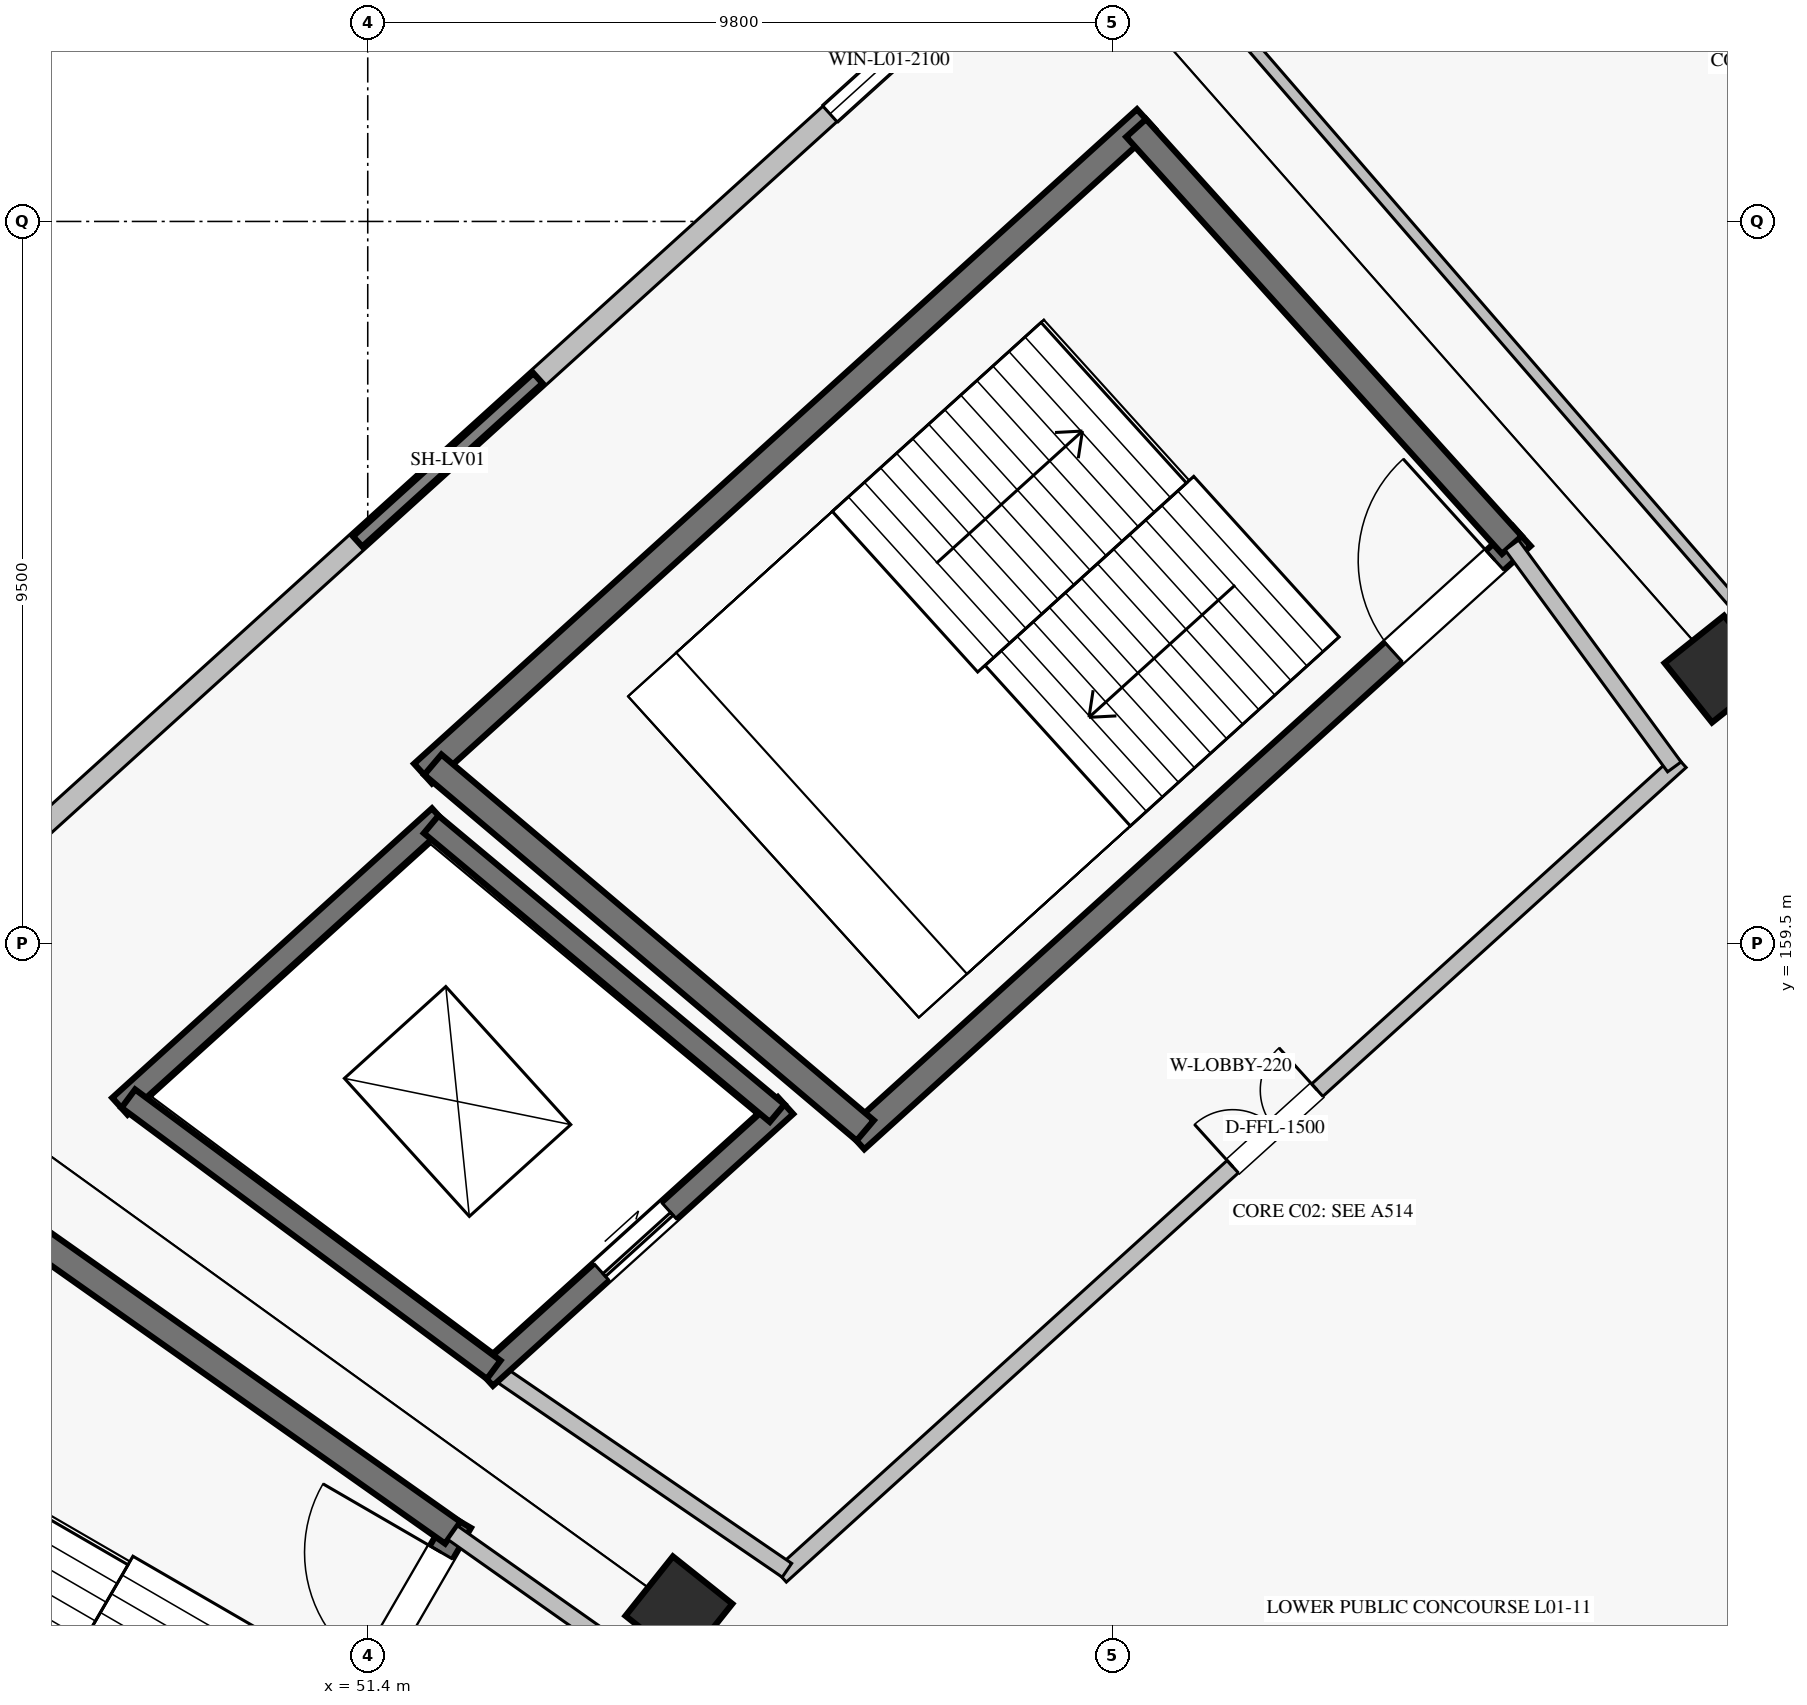
"""IFC4 building model, lengths in metres.
Left out: names, types, materials, properties, quantities, classifications, styles, units other than length and angle.
Written with IfcOpenShell. Run it as: python <this file> out.ifc"""

import sys

from ifc_helpers import new_model, si_unit, direction, frame, frame_2d, origin, origin_2d, place, context, subcontext, project, spatial, rectangle, extrude, element, fill, save


model = new_model("IFC4")
c1 = context("Model", 3, precision=1e-05, world=origin(), true_north=direction((0.0, 1.0)))
c2 = subcontext(c1, "Body", "Model", "MODEL_VIEW")
j1 = project(units=[si_unit("LENGTHUNIT", "METRE"), si_unit("PLANEANGLEUNIT", "RADIAN")], contexts=[c1])
p1 = place(None, origin())
s1 = spatial("IfcSite", under=j1, at=p1, CompositionType="ELEMENT")
p2 = place(p1, origin())
s2 = spatial("IfcBuilding", under=s1, at=p2, CompositionType="ELEMENT")
p3 = place(p2, frame((0.0, 0.0, 5.78)))
s3 = spatial("IfcBuildingStorey", under=s2, at=p3, CompositionType="ELEMENT", Elevation=5.78)
for number, where, z_axis, x_axis in (
    (1, (69.166, 163.111, 0.0), (0.0, 0.0, 1.0), (-0.623, 0.782, 0.0)),
    (2, (55.494, 150.734, 0.0), (0.0, 0.0, 1.0), (-0.782, 0.623, 0.0)),
):
    element("IfcColumn", number, at=place(p3, frame(where, z_axis=z_axis, x_axis=x_axis)), inside=s3, PredefinedType="COLUMN", context=c2, shape_type="SweptSolid", body=[
        extrude(rectangle(XDim=1.0, YDim=1.0, at=origin_2d()), origin(), (0.0, 0.0, 1.0), 4.76),
    ])
p4 = place(p3, frame((60.076, 172.764, 0.0), z_axis=(0.0, 0.0, 1.0), x_axis=(-0.741352367697, -0.671115986183, 0.0)))
e3 = element("IfcWall", 3, at=p4, inside=s3, PredefinedType="SOLIDWALL", context=c2, shape_type="SweptSolid", body=[
    extrude(rectangle(XDim=20.564, YDim=0.275, at=frame_2d((10.282, 0.0))), origin(), (0.0, 0.0, 1.0), 3.798),
])
p5 = place(p4, frame((1.4, 0.0, 1.0)))
e4 = element("IfcOpeningElement", 4, at=p5, cuts=e3, PredefinedType="OPENING", context=c2, shape_type="SweptSolid", body=[
    extrude(rectangle(XDim=2.1, YDim=1.6, at=frame_2d((1.05, 0.8))), frame((0.0, 0.147, 0.0), z_axis=(0.0, -1.0, 0.0), x_axis=(1.0, 0.0, 0.0)), (0.0, 0.0, 1.0), 0.295),
])
p6 = place(p3, frame((66.583, 164.86, 0.0), z_axis=(0.0, 0.0, 1.0), x_axis=(-0.741348929385, -0.671119784315, 0.0)))
e5 = element("IfcWall", 5, at=p6, inside=s3, PredefinedType="SHEAR", context=c2, shape_type="SweptSolid", body=[
    extrude(rectangle(XDim=11.826, YDim=0.35, at=frame_2d((5.913, 0.0))), origin(), (0.0, 0.0, 1.0), 4.5),
])
p7 = place(p6, frame((0.475, 0.0, 0.0)))
e6 = element("IfcOpeningElement", 6, at=p7, cuts=e5, PredefinedType="OPENING", context=c2, shape_type="SweptSolid", body=[
    extrude(rectangle(XDim=1.8, YDim=2.2, at=frame_2d((0.9, 1.1))), frame((0.0, 0.185, 0.0), z_axis=(0.0, -1.0, 0.0), x_axis=(1.0, 0.0, 0.0)), (0.0, 0.0, 1.0), 0.37),
])
p8 = place(p3, frame((61.639, 170.347, 0.0), z_axis=(0.0, 0.0, 1.0), x_axis=(-0.741351373721, -0.671117084183, 0.0)))
e7 = element("IfcWall", 7, at=p8, inside=s3, PredefinedType="SHEAR", context=c2, shape_type="SweptSolid", body=[
    extrude(rectangle(XDim=12.83, YDim=0.35, at=frame_2d((6.415, 0.0))), origin(), (0.0, 0.0, 1.0), 4.5),
])
p9 = place(p3, frame((66.454, 164.743, 0.0), z_axis=(0.0, 0.0, 1.0), x_axis=(-0.669463145673, 0.742845270958, 0.0)))
e8 = element("IfcWall", 8, at=p9, inside=s3, PredefinedType="SHEAR", context=c2, shape_type="SweptSolid", body=[
    extrude(rectangle(XDim=7.386, YDim=0.35, at=frame_2d((3.693, 0.0))), origin(), (0.0, 0.0, 1.0), 4.5),
])
p10 = place(p3, frame((57.945, 157.041, 0.0), z_axis=(0.0, 0.0, 1.0), x_axis=(-0.763422324031, 0.64589964791, 0.0)))
e9 = element("IfcWall", 9, at=p10, inside=s3, PredefinedType="SHEAR", context=c2, shape_type="SweptSolid", body=[
    extrude(rectangle(XDim=7.452, YDim=0.35, at=frame_2d((3.726, 0.0))), origin(), (0.0, 0.0, 1.0), 4.5),
])
p11 = place(p3, frame((56.897, 157.369, 0.0), z_axis=(0.0, 0.0, 1.0), x_axis=(-0.741350155641, -0.671118429736, 0.0)))
e10 = element("IfcWall", 10, at=p11, inside=s3, PredefinedType="SHEAR", context=c2, shape_type="SweptSolid", body=[
    extrude(rectangle(XDim=5.329, YDim=0.3, at=frame_2d((2.665, 0.0))), origin(), (0.0, 0.0, 1.0), 4.5),
])
p12 = place(p11, frame((2.065, 0.0, 0.0)))
e11 = element("IfcOpeningElement", 11, at=p12, cuts=e10, PredefinedType="OPENING", context=c2, shape_type="SweptSolid", body=[
    extrude(rectangle(XDim=1.2, YDim=2.2, at=frame_2d((0.6, 1.1))), frame((0.0, 0.16, 0.0), z_axis=(0.0, -1.0, 0.0), x_axis=(1.0, 0.0, 0.0)), (0.0, 0.0, 1.0), 0.32),
])
p13 = place(p3, frame((52.346, 161.168, 0.0), z_axis=(0.0, 0.0, 1.0), x_axis=(-0.74134208775, -0.671127341815, 0.0)))
e12 = element("IfcWall", 12, at=p13, inside=s3, PredefinedType="SHEAR", context=c2, shape_type="SweptSolid", body=[
    extrude(rectangle(XDim=5.675, YDim=0.3, at=frame_2d((2.837, 0.0))), origin(), (0.0, 0.0, 1.0), 4.5),
])
p14 = place(p3, frame((56.786, 157.268, 0.0), z_axis=(0.0, 0.0, 1.0), x_axis=(-0.767711354146, 0.640795815151, 0.0)))
e13 = element("IfcWall", 13, at=p14, inside=s3, PredefinedType="SHEAR", context=c2, shape_type="SweptSolid", body=[
    extrude(rectangle(XDim=5.929, YDim=0.3, at=frame_2d((2.964, 0.0))), origin(), (0.0, 0.0, 1.0), 4.5),
])
p15 = place(p3, frame((53.058, 153.893, 0.0), z_axis=(0.0, 0.0, 1.0), x_axis=(-0.803101805449, 0.59584183311, 0.0)))
e14 = element("IfcWall", 14, at=p15, inside=s3, PredefinedType="SHEAR", context=c2, shape_type="SweptSolid", body=[
    extrude(rectangle(XDim=5.986, YDim=0.3, at=frame_2d((2.993, 0.0))), origin(), (0.0, 0.0, 1.0), 4.5),
])
p16 = place(p3, frame((68.673, 161.898, 0.0), z_axis=(0.0, 0.0, 1.0), x_axis=(-0.741351035574, -0.671117457717, 0.0)))
e15 = element("IfcWall", 15, at=p16, inside=s3, PredefinedType="SOLIDWALL", context=c2, shape_type="SweptSolid", body=[
    extrude(rectangle(XDim=15.969, YDim=0.22, at=frame_2d((7.985, 0.0))), origin(), (0.0, 0.0, 1.0), 4.5),
])
p17 = place(p16, frame((6.447, 0.0, 0.0)))
e16 = element("IfcOpeningElement", 16, at=p17, cuts=e15, PredefinedType="OPENING", context=c2, shape_type="SweptSolid", body=[
    extrude(rectangle(XDim=1.5, YDim=2.2, at=frame_2d((0.75, 1.1))), frame((0.0, 0.12, 0.0), z_axis=(0.0, -1.0, 0.0), x_axis=(1.0, 0.0, 0.0)), (0.0, 0.0, 1.0), 0.24),
])
p18 = place(p3, frame((68.591, 161.824, 0.0), z_axis=(0.0, 0.0, 1.0), x_axis=(-0.590836915359, 0.806791013491, 0.0)))
e17 = element("IfcWall", 17, at=p18, inside=s3, PredefinedType="SOLIDWALL", context=c2, shape_type="SweptSolid", body=[
    extrude(rectangle(XDim=3.618, YDim=0.22, at=frame_2d((1.809, 0.0))), origin(), (0.0, 0.0, 1.0), 4.5),
])
p19 = place(p3, frame((56.915, 151.254, 0.0), z_axis=(0.0, 0.0, 1.0), x_axis=(-0.825385410642, 0.564569680287, 0.0)))
e18 = element("IfcWall", 18, at=p19, inside=s3, PredefinedType="SOLIDWALL", context=c2, shape_type="SweptSolid", body=[
    extrude(rectangle(XDim=4.674, YDim=0.22, at=frame_2d((2.337, 0.0))), origin(), (0.0, 0.0, 1.0), 4.5),
])
p20 = place(p3, frame((52.606, 151.9, 0.0), z_axis=(0.0, 0.0, 1.0), x_axis=(-0.501587404838, -0.865106973332, 0.0)))
e19 = element("IfcWall", 19, at=p20, inside=s3, PredefinedType="SHEAR", context=c2, shape_type="SweptSolid", body=[
    extrude(rectangle(XDim=11.435, YDim=0.35, at=frame_2d((5.718, 0.0))), origin(), (0.0, 0.0, 1.0), 4.5),
])
p21 = place(p20, frame((0.475, 0.0, 0.0)))
e20 = element("IfcOpeningElement", 20, at=p21, cuts=e19, PredefinedType="OPENING", context=c2, shape_type="SweptSolid", body=[
    extrude(rectangle(XDim=1.8, YDim=2.2, at=frame_2d((0.9, 1.1))), frame((0.0, 0.185, 0.0), z_axis=(0.0, -1.0, 0.0), x_axis=(1.0, 0.0, 0.0)), (0.0, 0.0, 1.0), 0.37),
])
p22 = place(p3, frame((52.519, 151.748, 0.0), z_axis=(0.0, 0.0, 1.0), x_axis=(-0.816983109824, 0.576661597701, 0.0)))
e21 = element("IfcWall", 21, at=p22, inside=s3, PredefinedType="SHEAR", context=c2, shape_type="SweptSolid", body=[
    extrude(rectangle(XDim=7.544, YDim=0.35, at=frame_2d((3.772, 0.0))), origin(), (0.0, 0.0, 1.0), 4.5),
])
p23 = place(p3, frame((54.889, 150.075, 0.0), z_axis=(0.0, 0.0, 1.0), x_axis=(-0.816984187086, 0.57666007149, 0.0)))
e22 = element("IfcWall", 22, at=p23, inside=s3, PredefinedType="SOLIDWALL", context=c2, shape_type="SweptSolid", body=[
    extrude(rectangle(XDim=2.901, YDim=0.22, at=frame_2d((1.451, 0.0))), origin(), (0.0, 0.0, 1.0), 4.5),
])
p24 = place(p3, frame((69.599, 163.72, 0.0), z_axis=(0.0, 0.0, 1.0), x_axis=(-0.654293035882, 0.756241114458, 0.0)))
e23 = element("IfcWall", 23, at=p24, inside=s3, PredefinedType="PARTITIONING", context=c2, shape_type="SweptSolid", body=[
    extrude(rectangle(XDim=12.091, YDim=0.15, at=frame_2d((6.045, 0.0))), origin(), (0.0, 0.0, 1.0), 3.82),
])
p25 = place(p5, origin())
e24 = element("IfcWindow", 24, at=p25, inside=s3, PartitioningType="SINGLE_PANEL", PredefinedType="WINDOW", context=c2, shape_type="SweptSolid", body=[
    extrude(rectangle(XDim=2.1, YDim=1.6, at=frame_2d((1.05, 0.8))), frame((0.0, 0.03, 0.0), z_axis=(0.0, -1.0, 0.0), x_axis=(1.0, 0.0, 0.0)), (0.0, 0.0, 1.0), 0.06),
])
fill(e4, e24)
p26 = place(p7, frame((1.8, 0.0, 0.0), z_axis=(0.0, 0.0, 1.0), x_axis=(-1.0, 0.0, 0.0)))
e25 = element("IfcDoor", 25, at=p26, inside=s3, OperationType="SINGLE_SWING_RIGHT", PredefinedType="DOOR", context=c2, shape_type="SweptSolid", body=[
    extrude(rectangle(XDim=1.8, YDim=2.2, at=frame_2d((0.9, 1.1))), frame((0.0, 0.025, 0.0), z_axis=(0.0, -1.0, 0.0), x_axis=(1.0, 0.0, 0.0)), (0.0, 0.0, 1.0), 0.05),
])
fill(e6, e25)
p27 = place(p12, origin())
e26 = element("IfcDoor", 26, at=p27, inside=s3, OperationType="SLIDING_TO_LEFT", PredefinedType="DOOR", context=c2, shape_type="SweptSolid", body=[
    extrude(rectangle(XDim=1.2, YDim=2.2, at=frame_2d((0.6, 1.1))), frame((0.0, 0.025, 0.0), z_axis=(0.0, -1.0, 0.0), x_axis=(1.0, 0.0, 0.0)), (0.0, 0.0, 1.0), 0.05),
])
fill(e11, e26)
p28 = place(p17, frame((1.5, 0.0, 0.0), z_axis=(0.0, 0.0, 1.0), x_axis=(-1.0, 0.0, 0.0)))
e27 = element("IfcDoor", 27, at=p28, inside=s3, OperationType="DOUBLE_DOOR_SINGLE_SWING", PredefinedType="DOOR", context=c2, shape_type="SweptSolid", body=[
    extrude(rectangle(XDim=1.5, YDim=2.2, at=frame_2d((0.75, 1.1))), frame((0.0, 0.025, 0.0), z_axis=(0.0, -1.0, 0.0), x_axis=(1.0, 0.0, 0.0)), (0.0, 0.0, 1.0), 0.05),
])
fill(e16, e27)
p29 = place(p21, frame((1.8, 0.0, 0.0), z_axis=(0.0, 0.0, 1.0), x_axis=(-1.0, 0.0, 0.0)))
e28 = element("IfcDoor", 28, at=p29, inside=s3, OperationType="SINGLE_SWING_RIGHT", PredefinedType="DOOR", context=c2, shape_type="SweptSolid", body=[
    extrude(rectangle(XDim=1.8, YDim=2.2, at=frame_2d((0.9, 1.1))), frame((0.0, 0.025, 0.0), z_axis=(0.0, -1.0, 0.0), x_axis=(1.0, 0.0, 0.0)), (0.0, 0.0, 1.0), 0.05),
])
fill(e20, e28)
save(model, sys.argv[1])
